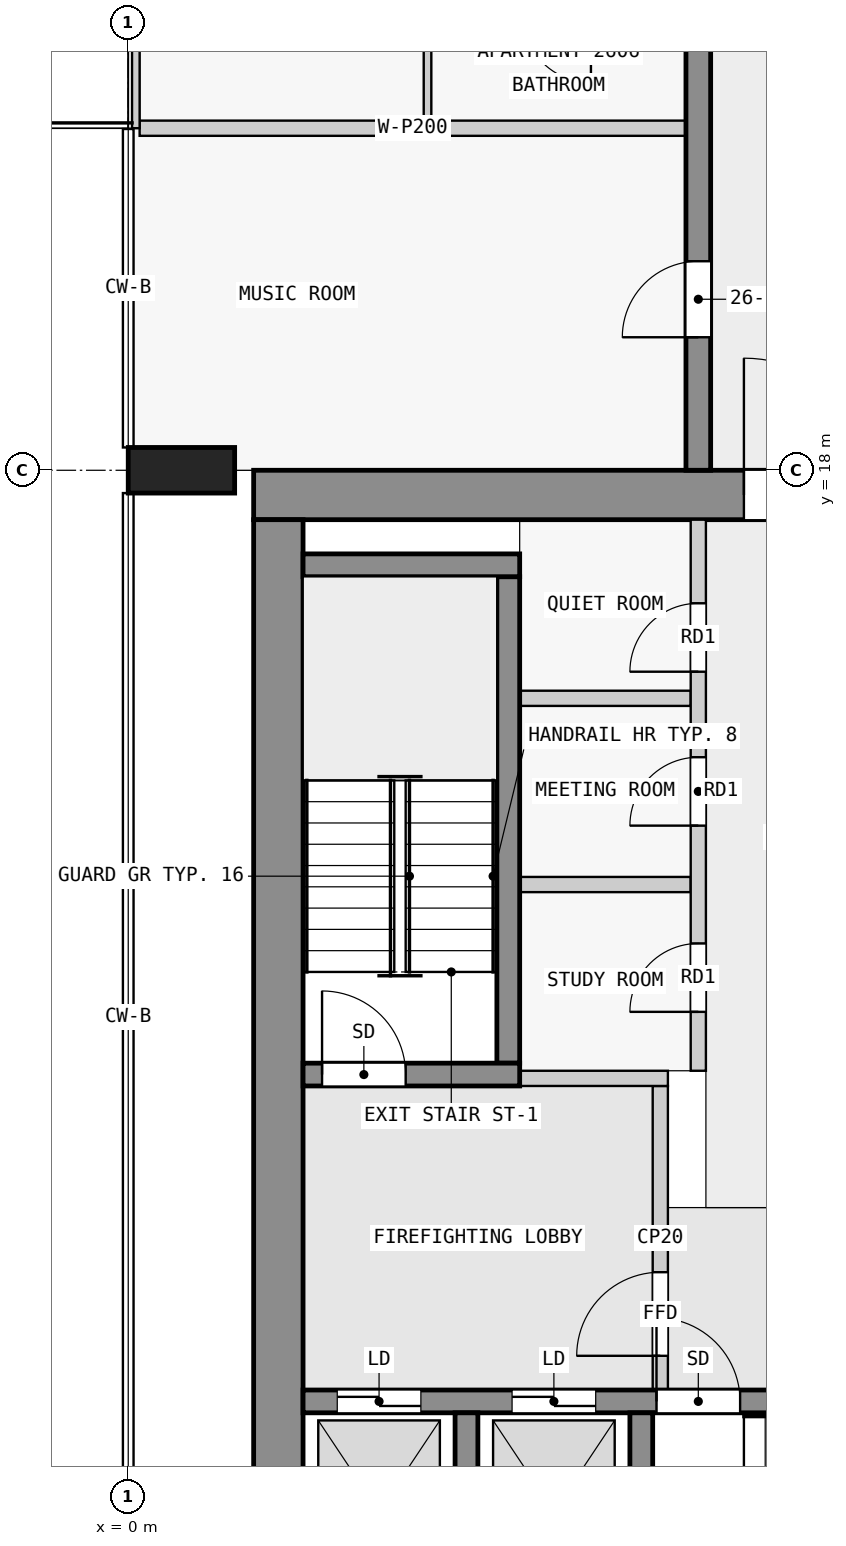
"""IFC4 building model, lengths in metres.
Left out: names, types, materials, properties, quantities, classifications, styles, units other than length and angle.
Written with IfcOpenShell. Run it as: python <this file> out.ifc"""

import sys

from ifc_helpers import new_model, si_unit, direction, frame, frame_2d, origin, origin_2d, place, context, subcontext, project, spatial, rectangle, extrude, element, fill, save


model = new_model("IFC4")
c1 = context("Model", 3, precision=1e-05, world=origin(), true_north=direction((0.0, 1.0)))
c2 = subcontext(c1, "Body", "Model", "MODEL_VIEW")
j1 = project(units=[si_unit("LENGTHUNIT", "METRE"), si_unit("PLANEANGLEUNIT", "RADIAN")], contexts=[c1])
p1 = place(None, origin())
s1 = spatial("IfcSite", under=j1, at=p1, CompositionType="ELEMENT")
p2 = place(p1, origin())
s2 = spatial("IfcBuilding", under=s1, at=p2, CompositionType="ELEMENT")
p3 = place(p2, frame((0.0, 0.0, 102.8)))
s3 = spatial("IfcBuildingStorey", under=s2, at=p3, CompositionType="ELEMENT", Elevation=102.8)
p4 = place(p3, frame((0.7, 18.0, 0.0), z_axis=(0.0, 0.0, 1.0), x_axis=(0.0, 1.0, 0.0)))
e1 = element("IfcColumn", 1, at=p4, inside=s3, PredefinedType="COLUMN", context=c2, shape_type="SweptSolid", body=[
    extrude(rectangle(XDim=0.6, YDim=1.4, at=origin_2d()), origin(), (0.0, 0.0, 1.0), 3.5),
])
p5 = place(p3, frame((1.65, 17.675, 0.0), z_axis=(0.0, 0.0, 1.0), x_axis=(1.0, 0.0, 0.0)))
e2 = element("IfcWall", 2, at=p5, inside=s3, PredefinedType="SHEAR", context=c2, shape_type="SweptSolid", body=[
    extrude(rectangle(XDim=20.85, YDim=0.65, at=frame_2d((10.425, 0.0))), origin(), (0.0, 0.0, 1.0), 3.25),
])
p6 = place(p5, frame((6.45, 0.0, 0.0)))
e3 = element("IfcOpeningElement", 3, at=p6, cuts=e2, PredefinedType="OPENING", context=c2, shape_type="SweptSolid", body=[
    extrude(rectangle(XDim=1.8, YDim=2.1, at=frame_2d((0.9, 1.05))), frame((0.0, 0.335, 0.0), z_axis=(0.0, -1.0, 0.0), x_axis=(1.0, 0.0, 0.0)), (0.0, 0.0, 1.0), 0.67),
])
p7 = place(p3, frame((1.975, 2.5, 0.0), z_axis=(0.0, 0.0, 1.0), x_axis=(0.0, 1.0, 0.0)))
e4 = element("IfcWall", 4, at=p7, inside=s3, PredefinedType="SHEAR", context=c2, shape_type="SweptSolid", body=[
    extrude(rectangle(XDim=14.85, YDim=0.65, at=frame_2d((7.425, 0.0))), origin(), (0.0, 0.0, 1.0), 3.25),
])
for number, where, z_axis, x_axis in (
    (5, (4.45, 2.8, 0.0), (0.0, 0.0, 1.0), (0.0, 1.0, 0.0)),
    (6, (6.75, 2.8, 0.0), (0.0, 0.0, 1.0), (0.0, 1.0, 0.0)),
):
    element("IfcWall", number, at=place(p3, frame(where, z_axis=z_axis, x_axis=x_axis)), inside=s3, PredefinedType="SHEAR", context=c2, shape_type="SweptSolid", body=[
        extrude(rectangle(XDim=2.8, YDim=0.3, at=frame_2d((1.4, 0.0))), origin(), (0.0, 0.0, 1.0), 3.25),
    ])
p8 = place(p3, frame((2.3, 5.75, 0.0), z_axis=(0.0, 0.0, 1.0), x_axis=(1.0, 0.0, 0.0)))
e7 = element("IfcWall", 7, at=p8, inside=s3, PredefinedType="SHEAR", context=c2, shape_type="SweptSolid", body=[
    extrude(rectangle(XDim=18.8, YDim=0.3, at=frame_2d((9.4, 0.0))), origin(), (0.0, 0.0, 1.0), 3.25),
])
p9 = place(p8, frame((4.65, 0.0, 0.0)))
e8 = element("IfcOpeningElement", 8, at=p9, cuts=e7, PredefinedType="OPENING", context=c2, shape_type="SweptSolid", body=[
    extrude(rectangle(XDim=1.1, YDim=2.1, at=frame_2d((0.55, 1.05))), frame((0.0, 0.16, 0.0), z_axis=(0.0, -1.0, 0.0), x_axis=(1.0, 0.0, 0.0)), (0.0, 0.0, 1.0), 0.32),
])
p10 = place(p8, frame((0.45, 0.0, 0.0)))
e9 = element("IfcOpeningElement", 9, at=p10, cuts=e7, PredefinedType="OPENING", context=c2, shape_type="SweptSolid", body=[
    extrude(rectangle(XDim=1.1, YDim=2.1, at=frame_2d((0.55, 1.05))), frame((0.0, 0.16, 0.0), z_axis=(0.0, -1.0, 0.0), x_axis=(1.0, 0.0, 0.0)), (0.0, 0.0, 1.0), 0.32),
])
p11 = place(p8, frame((2.75, 0.0, 0.0)))
e10 = element("IfcOpeningElement", 10, at=p11, cuts=e7, PredefinedType="OPENING", context=c2, shape_type="SweptSolid", body=[
    extrude(rectangle(XDim=1.1, YDim=2.1, at=frame_2d((0.55, 1.05))), frame((0.0, 0.16, 0.0), z_axis=(0.0, -1.0, 0.0), x_axis=(1.0, 0.0, 0.0)), (0.0, 0.0, 1.0), 0.32),
])
p12 = place(p8, frame((11.85, 0.0, 0.0)))
e11 = element("IfcOpeningElement", 11, at=p12, cuts=e7, PredefinedType="OPENING", context=c2, shape_type="SweptSolid", body=[
    extrude(rectangle(XDim=1.1, YDim=2.1, at=frame_2d((0.55, 1.05))), frame((0.0, 0.16, 0.0), z_axis=(0.0, -1.0, 0.0), x_axis=(1.0, 0.0, 0.0)), (0.0, 0.0, 1.0), 0.32),
])
p13 = place(p8, frame((14.35, 0.0, 0.0)))
e12 = element("IfcOpeningElement", 12, at=p13, cuts=e7, PredefinedType="OPENING", context=c2, shape_type="SweptSolid", body=[
    extrude(rectangle(XDim=1.1, YDim=2.1, at=frame_2d((0.55, 1.05))), frame((0.0, 0.16, 0.0), z_axis=(0.0, -1.0, 0.0), x_axis=(1.0, 0.0, 0.0)), (0.0, 0.0, 1.0), 0.32),
])
p14 = place(p8, frame((16.85, 0.0, 0.0)))
e13 = element("IfcOpeningElement", 13, at=p14, cuts=e7, PredefinedType="OPENING", context=c2, shape_type="SweptSolid", body=[
    extrude(rectangle(XDim=1.1, YDim=2.1, at=frame_2d((0.55, 1.05))), frame((0.0, 0.16, 0.0), z_axis=(0.0, -1.0, 0.0), x_axis=(1.0, 0.0, 0.0)), (0.0, 0.0, 1.0), 0.32),
])
p15 = place(p3, frame((2.3, 10.05, 0.0), z_axis=(0.0, 0.0, 1.0), x_axis=(1.0, 0.0, 0.0)))
e14 = element("IfcWall", 14, at=p15, inside=s3, PredefinedType="SHEAR", context=c2, shape_type="SweptSolid", body=[
    extrude(rectangle(XDim=2.85, YDim=0.3, at=frame_2d((1.425, 0.0))), origin(), (0.0, 0.0, 1.0), 3.25),
])
p16 = place(p15, frame((0.25, 0.0, 0.0)))
e15 = element("IfcOpeningElement", 15, at=p16, cuts=e14, PredefinedType="OPENING", context=c2, shape_type="SweptSolid", body=[
    extrude(rectangle(XDim=1.1, YDim=2.1, at=frame_2d((0.55, 1.05))), frame((0.0, 0.16, 0.0), z_axis=(0.0, -1.0, 0.0), x_axis=(1.0, 0.0, 0.0)), (0.0, 0.0, 1.0), 0.32),
])
p17 = place(p3, frame((5.0, 10.2, 0.0), z_axis=(0.0, 0.0, 1.0), x_axis=(0.0, 1.0, 0.0)))
e16 = element("IfcWall", 16, at=p17, inside=s3, PredefinedType="SHEAR", context=c2, shape_type="SweptSolid", body=[
    extrude(rectangle(XDim=6.4, YDim=0.3, at=frame_2d((3.2, 0.0))), origin(), (0.0, 0.0, 1.0), 3.25),
])
p18 = place(p3, frame((2.3, 16.75, 0.0), z_axis=(0.0, 0.0, 1.0), x_axis=(1.0, 0.0, 0.0)))
e17 = element("IfcWall", 17, at=p18, inside=s3, PredefinedType="SHEAR", context=c2, shape_type="SweptSolid", body=[
    extrude(rectangle(XDim=2.85, YDim=0.3, at=frame_2d((1.425, 0.0))), origin(), (0.0, 0.0, 1.0), 3.25),
])
p19 = place(p3, frame((7.5, 18.0, 0.0), z_axis=(0.0, 0.0, 1.0), x_axis=(0.0, 1.0, 0.0)))
e18 = element("IfcWall", 18, at=p19, inside=s3, PredefinedType="SHEAR", context=c2, shape_type="SweptSolid", body=[
    extrude(rectangle(XDim=27.0, YDim=0.325, at=frame_2d((13.5, 0.0))), origin(), (0.0, 0.0, 1.0), 3.25),
])
p20 = place(p19, frame((1.75, 0.0, 0.0)))
e19 = element("IfcOpeningElement", 19, at=p20, cuts=e18, PredefinedType="OPENING", context=c2, shape_type="SweptSolid", body=[
    extrude(rectangle(XDim=1.0, YDim=2.1, at=frame_2d((0.5, 1.05))), frame((0.0, 0.172, 0.0), z_axis=(0.0, -1.0, 0.0), x_axis=(1.0, 0.0, 0.0)), (0.0, 0.0, 1.0), 0.345),
])
p21 = place(p19, frame((6.25, 0.0, 0.0)))
e20 = element("IfcOpeningElement", 20, at=p21, cuts=e18, PredefinedType="OPENING", context=c2, shape_type="SweptSolid", body=[
    extrude(rectangle(XDim=1.0, YDim=2.1, at=frame_2d((0.5, 1.05))), frame((0.0, 0.172, 0.0), z_axis=(0.0, -1.0, 0.0), x_axis=(1.0, 0.0, 0.0)), (0.0, 0.0, 1.0), 0.345),
])
p22 = place(p19, frame((10.75, 0.0, 0.0)))
e21 = element("IfcOpeningElement", 21, at=p22, cuts=e18, PredefinedType="OPENING", context=c2, shape_type="SweptSolid", body=[
    extrude(rectangle(XDim=1.0, YDim=2.1, at=frame_2d((0.5, 1.05))), frame((0.0, 0.172, 0.0), z_axis=(0.0, -1.0, 0.0), x_axis=(1.0, 0.0, 0.0)), (0.0, 0.0, 1.0), 0.345),
])
p23 = place(p19, frame((15.25, 0.0, 0.0)))
e22 = element("IfcOpeningElement", 22, at=p23, cuts=e18, PredefinedType="OPENING", context=c2, shape_type="SweptSolid", body=[
    extrude(rectangle(XDim=1.0, YDim=2.1, at=frame_2d((0.5, 1.05))), frame((0.0, 0.172, 0.0), z_axis=(0.0, -1.0, 0.0), x_axis=(1.0, 0.0, 0.0)), (0.0, 0.0, 1.0), 0.345),
])
p24 = place(p19, frame((19.75, 0.0, 0.0)))
e23 = element("IfcOpeningElement", 23, at=p24, cuts=e18, PredefinedType="OPENING", context=c2, shape_type="SweptSolid", body=[
    extrude(rectangle(XDim=1.0, YDim=2.1, at=frame_2d((0.5, 1.05))), frame((0.0, 0.172, 0.0), z_axis=(0.0, -1.0, 0.0), x_axis=(1.0, 0.0, 0.0)), (0.0, 0.0, 1.0), 0.345),
])
p25 = place(p19, frame((23.25, 0.0, 0.0)))
e24 = element("IfcOpeningElement", 24, at=p25, cuts=e18, PredefinedType="OPENING", context=c2, shape_type="SweptSolid", body=[
    extrude(rectangle(XDim=0.9, YDim=2.1, at=frame_2d((0.45, 1.05))), frame((0.0, 0.172, 0.0), z_axis=(0.0, -1.0, 0.0), x_axis=(1.0, 0.0, 0.0)), (0.0, 0.0, 1.0), 0.345),
])
p26 = place(p19, frame((25.45, 0.0, 0.0)))
e25 = element("IfcOpeningElement", 25, at=p26, cuts=e18, PredefinedType="OPENING", context=c2, shape_type="SweptSolid", body=[
    extrude(rectangle(XDim=1.0, YDim=2.1, at=frame_2d((0.5, 1.05))), frame((0.0, 0.172, 0.0), z_axis=(0.0, -1.0, 0.0), x_axis=(1.0, 0.0, 0.0)), (0.0, 0.0, 1.0), 0.345),
])
p27 = place(p3, frame((0.1, 22.5, 0.0), z_axis=(0.0, 0.0, 1.0), x_axis=(0.0, 1.0, 0.0)))
e26 = element("IfcWall", 26, at=p27, inside=s3, PredefinedType="STANDARD", context=c2, shape_type="SweptSolid", body=[
    extrude(rectangle(XDim=4.5, YDim=0.1, at=frame_2d((2.25, 0.0))), origin(), (0.0, 0.0, 1.0), 3.25),
])
p28 = place(p27, frame((1.05, 0.0, 0.0)))
e27 = element("IfcOpeningElement", 27, at=p28, cuts=e26, PredefinedType="OPENING", context=c2, shape_type="SweptSolid", body=[
    extrude(rectangle(XDim=2.4, YDim=2.4, at=frame_2d((1.2, 1.2))), frame((0.0, 0.06, 0.0), z_axis=(0.0, -1.0, 0.0), x_axis=(1.0, 0.0, 0.0)), (0.0, 0.0, 1.0), 0.12),
])
p29 = place(p3, frame((7.0, 5.9, 0.0), z_axis=(0.0, 0.0, 1.0), x_axis=(0.0, 1.0, 0.0)))
e28 = element("IfcWall", 28, at=p29, inside=s3, PredefinedType="PARTITIONING", context=c2, shape_type="SweptSolid", body=[
    extrude(rectangle(XDim=4.0, YDim=0.2, at=frame_2d((2.0, 0.0))), origin(), (0.0, 0.0, 1.0), 3.25),
])
p30 = place(p29, frame((0.45, 0.0, 0.0)))
e29 = element("IfcOpeningElement", 29, at=p30, cuts=e28, PredefinedType="OPENING", context=c2, shape_type="SweptSolid", body=[
    extrude(rectangle(XDim=1.1, YDim=2.1, at=frame_2d((0.55, 1.05))), frame((0.0, 0.11, 0.0), z_axis=(0.0, -1.0, 0.0), x_axis=(1.0, 0.0, 0.0)), (0.0, 0.0, 1.0), 0.22),
])
p31 = place(p3, frame((5.15, 10.0, 0.0), z_axis=(0.0, 0.0, 1.0), x_axis=(1.0, 0.0, 0.0)))
e30 = element("IfcWall", 30, at=p31, inside=s3, PredefinedType="PARTITIONING", context=c2, shape_type="SweptSolid", body=[
    extrude(rectangle(XDim=1.95, YDim=0.2, at=frame_2d((0.975, 0.0))), origin(), (0.0, 0.0, 1.0), 3.25),
])
p32 = place(p3, frame((7.5, 10.1, 0.0), z_axis=(0.0, 0.0, 1.0), x_axis=(0.0, 1.0, 0.0)))
e31 = element("IfcWall", 31, at=p32, inside=s3, PredefinedType="PARTITIONING", context=c2, shape_type="SweptSolid", body=[
    extrude(rectangle(XDim=7.25, YDim=0.2, at=frame_2d((3.625, 0.0))), origin(), (0.0, 0.0, 1.0), 3.25),
])
p33 = place(p32, frame((0.775, 0.0, 0.0)))
e32 = element("IfcOpeningElement", 32, at=p33, cuts=e31, PredefinedType="OPENING", context=c2, shape_type="SweptSolid", body=[
    extrude(rectangle(XDim=0.9, YDim=2.1, at=frame_2d((0.45, 1.05))), frame((0.0, 0.11, 0.0), z_axis=(0.0, -1.0, 0.0), x_axis=(1.0, 0.0, 0.0)), (0.0, 0.0, 1.0), 0.22),
])
p34 = place(p32, frame((3.225, 0.0, 0.0)))
e33 = element("IfcOpeningElement", 33, at=p34, cuts=e31, PredefinedType="OPENING", context=c2, shape_type="SweptSolid", body=[
    extrude(rectangle(XDim=0.9, YDim=2.1, at=frame_2d((0.45, 1.05))), frame((0.0, 0.11, 0.0), z_axis=(0.0, -1.0, 0.0), x_axis=(1.0, 0.0, 0.0)), (0.0, 0.0, 1.0), 0.22),
])
p35 = place(p32, frame((5.25, 0.0, 0.0)))
e34 = element("IfcOpeningElement", 34, at=p35, cuts=e31, PredefinedType="OPENING", context=c2, shape_type="SweptSolid", body=[
    extrude(rectangle(XDim=0.9, YDim=2.1, at=frame_2d((0.45, 1.05))), frame((0.0, 0.11, 0.0), z_axis=(0.0, -1.0, 0.0), x_axis=(1.0, 0.0, 0.0)), (0.0, 0.0, 1.0), 0.22),
])
for number, where, z_axis, x_axis in (
    (35, (5.15, 12.55, 0.0), (0.0, 0.0, 1.0), (1.0, 0.0, 0.0)),
    (36, (5.15, 15.0, 0.0), (0.0, 0.0, 1.0), (1.0, 0.0, 0.0)),
):
    element("IfcWall", number, at=place(p3, frame(where, z_axis=z_axis, x_axis=x_axis)), inside=s3, PredefinedType="PARTITIONING", context=c2, shape_type="SweptSolid", body=[
        extrude(rectangle(XDim=2.25, YDim=0.2, at=frame_2d((1.125, 0.0))), origin(), (0.0, 0.0, 1.0), 3.25),
    ])
p36 = place(p3, frame((7.337, 22.5, 0.0), z_axis=(0.0, 0.0, 1.0), x_axis=(-1.0, 0.0, 0.0)))
e37 = element("IfcWall", 37, at=p36, inside=s3, PredefinedType="PARTITIONING", context=c2, shape_type="SweptSolid", body=[
    extrude(rectangle(XDim=7.188, YDim=0.2, at=frame_2d((3.594, 0.0))), origin(), (0.0, 0.0, 1.0), 3.25),
])
p37 = place(p3, frame((3.938, 23.95, 0.0), z_axis=(0.0, 0.0, 1.0), x_axis=(0.0, -1.0, 0.0)))
e38 = element("IfcWall", 38, at=p37, inside=s3, PredefinedType="PARTITIONING", context=c2, shape_type="SweptSolid", body=[
    extrude(rectangle(XDim=1.35, YDim=0.1, at=frame_2d((0.675, 0.0))), origin(), (0.0, 0.0, 1.0), 3.25),
])
p38 = place(p30, origin())
e39 = element("IfcDoor", 39, at=p38, inside=s3, OperationType="SINGLE_SWING_LEFT", PredefinedType="DOOR", context=c2, shape_type="SweptSolid", body=[
    extrude(rectangle(XDim=1.1, YDim=2.1, at=frame_2d((0.55, 1.05))), frame((0.0, 0.025, 0.0), z_axis=(0.0, -1.0, 0.0), x_axis=(1.0, 0.0, 0.0)), (0.0, 0.0, 1.0), 0.05),
])
fill(e29, e39)
p39 = place(p16, origin())
e40 = element("IfcDoor", 40, at=p39, inside=s3, OperationType="SINGLE_SWING_RIGHT", PredefinedType="DOOR", context=c2, shape_type="SweptSolid", body=[
    extrude(rectangle(XDim=1.1, YDim=2.1, at=frame_2d((0.55, 1.05))), frame((0.0, 0.025, 0.0), z_axis=(0.0, -1.0, 0.0), x_axis=(1.0, 0.0, 0.0)), (0.0, 0.0, 1.0), 0.05),
])
fill(e15, e40)
p40 = place(p9, origin())
e41 = element("IfcDoor", 41, at=p40, inside=s3, OperationType="SINGLE_SWING_LEFT", PredefinedType="DOOR", context=c2, shape_type="SweptSolid", body=[
    extrude(rectangle(XDim=1.1, YDim=2.1, at=frame_2d((0.55, 1.05))), frame((0.0, 0.025, 0.0), z_axis=(0.0, -1.0, 0.0), x_axis=(1.0, 0.0, 0.0)), (0.0, 0.0, 1.0), 0.05),
])
fill(e8, e41)
p41 = place(p10, origin())
e42 = element("IfcDoor", 42, at=p41, inside=s3, OperationType="DOUBLE_DOOR_SLIDING", PredefinedType="DOOR", context=c2, shape_type="SweptSolid", body=[
    extrude(rectangle(XDim=1.1, YDim=2.1, at=frame_2d((0.55, 1.05))), frame((0.0, 0.025, 0.0), z_axis=(0.0, -1.0, 0.0), x_axis=(1.0, 0.0, 0.0)), (0.0, 0.0, 1.0), 0.05),
])
fill(e9, e42)
p42 = place(p11, origin())
e43 = element("IfcDoor", 43, at=p42, inside=s3, OperationType="DOUBLE_DOOR_SLIDING", PredefinedType="DOOR", context=c2, shape_type="SweptSolid", body=[
    extrude(rectangle(XDim=1.1, YDim=2.1, at=frame_2d((0.55, 1.05))), frame((0.0, 0.025, 0.0), z_axis=(0.0, -1.0, 0.0), x_axis=(1.0, 0.0, 0.0)), (0.0, 0.0, 1.0), 0.05),
])
fill(e10, e43)
p43 = place(p6, origin())
e44 = element("IfcDoor", 44, at=p43, inside=s3, OperationType="DOUBLE_DOOR_SINGLE_SWING", PredefinedType="DOOR", context=c2, shape_type="SweptSolid", body=[
    extrude(rectangle(XDim=1.8, YDim=2.1, at=frame_2d((0.9, 1.05))), frame((0.0, 0.025, 0.0), z_axis=(0.0, -1.0, 0.0), x_axis=(1.0, 0.0, 0.0)), (0.0, 0.0, 1.0), 0.05),
])
fill(e3, e44)
p44 = place(p33, origin())
e45 = element("IfcDoor", 45, at=p44, inside=s3, OperationType="SINGLE_SWING_RIGHT", PredefinedType="DOOR", context=c2, shape_type="SweptSolid", body=[
    extrude(rectangle(XDim=0.9, YDim=2.1, at=frame_2d((0.45, 1.05))), frame((0.0, 0.025, 0.0), z_axis=(0.0, -1.0, 0.0), x_axis=(1.0, 0.0, 0.0)), (0.0, 0.0, 1.0), 0.05),
])
fill(e32, e45)
p45 = place(p34, origin())
e46 = element("IfcDoor", 46, at=p45, inside=s3, OperationType="SINGLE_SWING_RIGHT", PredefinedType="DOOR", context=c2, shape_type="SweptSolid", body=[
    extrude(rectangle(XDim=0.9, YDim=2.1, at=frame_2d((0.45, 1.05))), frame((0.0, 0.025, 0.0), z_axis=(0.0, -1.0, 0.0), x_axis=(1.0, 0.0, 0.0)), (0.0, 0.0, 1.0), 0.05),
])
fill(e33, e46)
p46 = place(p35, origin())
e47 = element("IfcDoor", 47, at=p46, inside=s3, OperationType="SINGLE_SWING_RIGHT", PredefinedType="DOOR", context=c2, shape_type="SweptSolid", body=[
    extrude(rectangle(XDim=0.9, YDim=2.1, at=frame_2d((0.45, 1.05))), frame((0.0, 0.025, 0.0), z_axis=(0.0, -1.0, 0.0), x_axis=(1.0, 0.0, 0.0)), (0.0, 0.0, 1.0), 0.05),
])
fill(e34, e47)
p47 = place(p20, origin())
e48 = element("IfcDoor", 48, at=p47, inside=s3, OperationType="SINGLE_SWING_LEFT", PredefinedType="DOOR", context=c2, shape_type="SweptSolid", body=[
    extrude(rectangle(XDim=1.0, YDim=2.1, at=frame_2d((0.5, 1.05))), frame((0.0, 0.025, 0.0), z_axis=(0.0, -1.0, 0.0), x_axis=(1.0, 0.0, 0.0)), (0.0, 0.0, 1.0), 0.05),
])
fill(e19, e48)
save(model, sys.argv[1])
